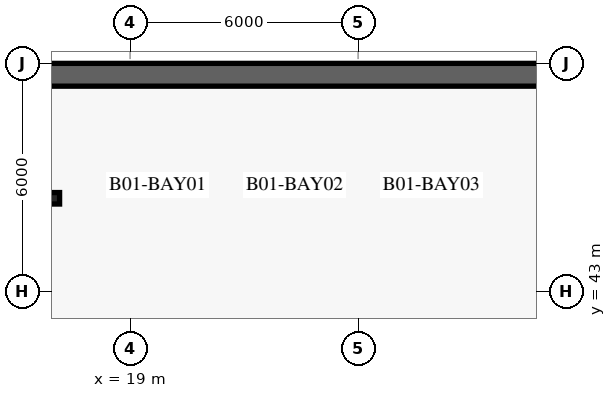
"""IFC4 building model, lengths in metres.
Left out: names, types, materials, properties, quantities, classifications, styles, units other than length and angle.
Written with IfcOpenShell. Run it as: python <this file> out.ifc"""

import sys

from ifc_helpers import new_model, si_unit, direction, frame, frame_2d, origin, place, context, subcontext, project, spatial, rectangle, extrude, element, save


model = new_model("IFC4")
c1 = context("Model", 3, precision=1e-05, world=origin(), true_north=direction((0.0, 1.0)))
c2 = subcontext(c1, "Body", "Model", "MODEL_VIEW")
j1 = project(units=[si_unit("LENGTHUNIT", "METRE"), si_unit("PLANEANGLEUNIT", "RADIAN")], contexts=[c1])
p1 = place(None, origin())
s1 = spatial("IfcSite", under=j1, at=p1, CompositionType="ELEMENT")
p2 = place(p1, origin())
s2 = spatial("IfcBuilding", under=s1, at=p2, CompositionType="ELEMENT")
p3 = place(p2, frame((0.0, 0.0, -4.2)))
s3 = spatial("IfcBuildingStorey", under=s2, at=p3, CompositionType="ELEMENT", Elevation=-4.2)
p4 = place(p3, frame((75.0, 48.7, 0.0), z_axis=(0.0, 0.0, 1.0), x_axis=(-1.0, 0.0, 0.0)))
e1 = element("IfcWall", 1, at=p4, inside=s3, PredefinedType="USERDEFINED", context=c2, shape_type="SweptSolid", body=[
    extrude(rectangle(XDim=74.0, YDim=0.6, at=frame_2d((37.0, 0.0))), origin(), (0.0, 0.0, 1.0), 3.88),
])
save(model, sys.argv[1])
